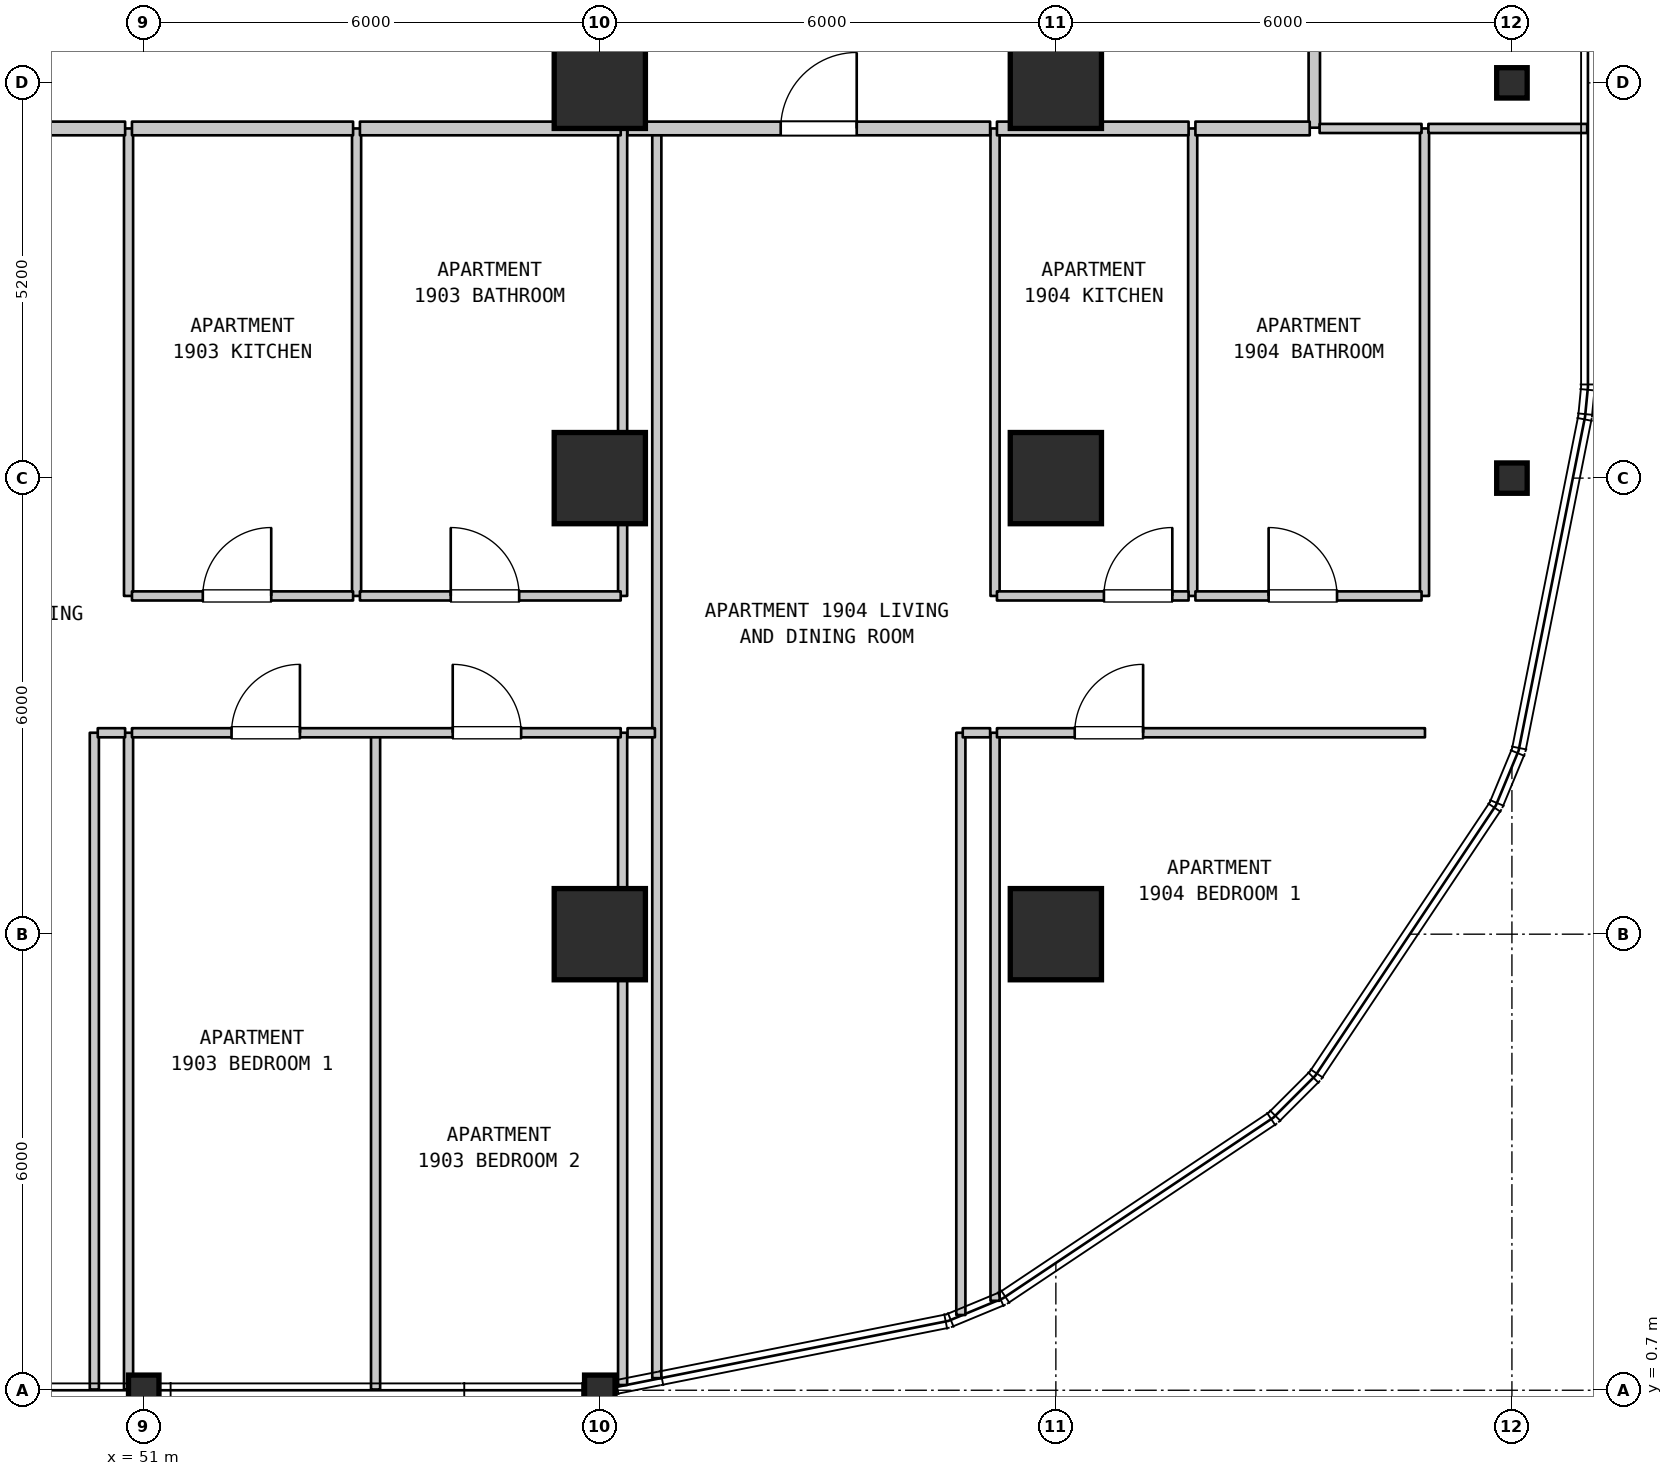
"""IFC4 building model, lengths in metres.
Left out: names, types, materials, properties, quantities, classifications, styles, units other than length and angle.
Written with IfcOpenShell. Run it as: python <this file> out.ifc"""

import sys

from ifc_helpers import new_model, si_unit, direction, frame, frame_2d, origin, origin_2d, place, context, subcontext, project, spatial, rectangle, i_section, extrude, element, fill, save


model = new_model("IFC4")
c1 = context("Model", 3, precision=1e-05, world=origin(), true_north=direction((0.0, 1.0)))
c2 = subcontext(c1, "Body", "Model", "MODEL_VIEW")
j1 = project(units=[si_unit("LENGTHUNIT", "METRE"), si_unit("PLANEANGLEUNIT", "RADIAN")], contexts=[c1])
p1 = place(None, origin())
s1 = spatial("IfcSite", under=j1, at=p1, CompositionType="ELEMENT")
p2 = place(p1, origin())
s2 = spatial("IfcBuilding", under=s1, at=p2, CompositionType="ELEMENT")
p3 = place(p2, frame((0.0, 0.0, 81.2)))
s3 = spatial("IfcBuildingStorey", under=s2, at=p3, CompositionType="ELEMENT", Elevation=81.2)
for number, where, z_axis, x_axis in (
    (1, (51.0, 0.7, 0.0), (0.0, 0.0, 1.0), (1.0, 0.0, 0.0)),
    (2, (57.0, 0.7, 0.0), (0.0, 0.0, 1.0), (1.0, 0.0, 0.0)),
):
    element("IfcColumn", number, at=place(p3, frame(where, z_axis=z_axis, x_axis=x_axis)), inside=s3, PredefinedType="COLUMN", context=c2, shape_type="SweptSolid", body=[
        extrude(i_section(OverallWidth=0.401, OverallDepth=0.399, WebThickness=0.025, FlangeThickness=0.04, FilletRadius=0.015, at=origin_2d()), origin(), (0.0, 0.0, 1.0), 5.2),
    ])
for number, where, z_axis, x_axis in (
    (3, (57.0, 6.7, 0.0), (0.0, 0.0, 1.0), (1.0, 0.0, 0.0)),
    (4, (57.0, 12.7, 0.0), (0.0, 0.0, 1.0), (1.0, 0.0, 0.0)),
    (5, (57.0, 17.9, 0.0), (0.0, 0.0, 1.0), (1.0, 0.0, 0.0)),
    (6, (63.0, 6.7, 0.0), (0.0, 0.0, 1.0), (1.0, 0.0, 0.0)),
    (7, (63.0, 12.7, 0.0), (0.0, 0.0, 1.0), (1.0, 0.0, 0.0)),
    (8, (63.0, 17.9, 0.0), (0.0, 0.0, 1.0), (1.0, 0.0, 0.0)),
):
    element("IfcColumn", number, at=place(p3, frame(where, z_axis=z_axis, x_axis=x_axis)), inside=s3, PredefinedType="COLUMN", context=c2, shape_type="SweptSolid", body=[
        extrude(rectangle(XDim=1.2, YDim=1.2, at=origin_2d()), origin(), (0.0, 0.0, 1.0), 5.2),
    ])
for number, where, z_axis, x_axis in (
    (9, (69.0, 12.7, 0.0), (0.0, 0.0, 1.0), (1.0, 0.0, 0.0)),
    (10, (69.0, 17.9, 0.0), (0.0, 0.0, 1.0), (1.0, 0.0, 0.0)),
):
    element("IfcColumn", number, at=place(p3, frame(where, z_axis=z_axis, x_axis=x_axis)), inside=s3, PredefinedType="COLUMN", context=c2, shape_type="SweptSolid", body=[
        extrude(i_section(OverallWidth=0.401, OverallDepth=0.399, WebThickness=0.025, FlangeThickness=0.04, FilletRadius=0.015, at=origin_2d()), origin(), (0.0, 0.0, 1.0), 5.2),
    ])
for number, where, z_axis, x_axis in (
    (11, (50.35, 0.71, 0.0), (0.0, 0.0, 1.0), (0.0, 1.0, 0.0)),
    (12, (50.8, 0.71, 0.0), (0.0, 0.0, 1.0), (0.0, 1.0, 0.0)),
):
    element("IfcWall", number, at=place(p3, frame(where, z_axis=z_axis, x_axis=x_axis)), inside=s3, PredefinedType="PARTITIONING", context=c2, shape_type="SweptSolid", body=[
        extrude(rectangle(XDim=8.64, YDim=0.12, at=frame_2d((4.32, 0.0))), origin(), (0.0, 0.0, 1.0), 4.885),
    ])
for number, where, z_axis, x_axis in (
    (13, (50.8, 11.15, 0.0), (0.0, 0.0, 1.0), (0.0, 1.0, 0.0)),
    (14, (53.8, 11.15, 0.0), (0.0, 0.0, 1.0), (0.0, 1.0, 0.0)),
):
    element("IfcWall", number, at=place(p3, frame(where, z_axis=z_axis, x_axis=x_axis)), inside=s3, PredefinedType="PARTITIONING", context=c2, shape_type="SweptSolid", body=[
        extrude(rectangle(XDim=6.15, YDim=0.12, at=frame_2d((3.075, 0.0))), origin(), (0.0, 0.0, 1.0), 4.885),
    ])
p4 = place(p3, frame((54.05, 0.71, 0.0), z_axis=(0.0, 0.0, 1.0), x_axis=(0.0, 1.0, 0.0)))
e15 = element("IfcWall", 15, at=p4, inside=s3, PredefinedType="PARTITIONING", context=c2, shape_type="SweptSolid", body=[
    extrude(rectangle(XDim=8.64, YDim=0.12, at=frame_2d((4.32, 0.0))), origin(), (0.0, 0.0, 1.0), 4.885),
])
p5 = place(p3, frame((57.3, 0.769, 0.0), z_axis=(0.0, 0.0, 1.0), x_axis=(0.0, 1.0, 0.0)))
e16 = element("IfcWall", 16, at=p5, inside=s3, PredefinedType="PARTITIONING", context=c2, shape_type="SweptSolid", body=[
    extrude(rectangle(XDim=8.581, YDim=0.12, at=frame_2d((4.291, 0.0))), origin(), (0.0, 0.0, 1.0), 4.885),
])
p6 = place(p3, frame((57.3, 11.15, 0.0), z_axis=(0.0, 0.0, 1.0), x_axis=(0.0, 1.0, 0.0)))
e17 = element("IfcWall", 17, at=p6, inside=s3, PredefinedType="PARTITIONING", context=c2, shape_type="SweptSolid", body=[
    extrude(rectangle(XDim=6.15, YDim=0.12, at=frame_2d((3.075, 0.0))), origin(), (0.0, 0.0, 1.0), 4.885),
])
p7 = place(p3, frame((57.75, 0.859, 0.0), z_axis=(0.0, 0.0, 1.0), x_axis=(0.0, 1.0, 0.0)))
e18 = element("IfcWall", 18, at=p7, inside=s3, PredefinedType="PARTITIONING", context=c2, shape_type="SweptSolid", body=[
    extrude(rectangle(XDim=16.441, YDim=0.12, at=frame_2d((8.221, 0.0))), origin(), (0.0, 0.0, 1.0), 4.885),
])
p8 = place(p3, frame((61.75, 1.69, 0.0), z_axis=(0.0, 0.0, 1.0), x_axis=(0.0, 1.0, 0.0)))
e19 = element("IfcWall", 19, at=p8, inside=s3, PredefinedType="PARTITIONING", context=c2, shape_type="SweptSolid", body=[
    extrude(rectangle(XDim=7.66, YDim=0.12, at=frame_2d((3.83, 0.0))), origin(), (0.0, 0.0, 1.0), 4.885),
])
p9 = place(p3, frame((62.2, 1.877, 0.0), z_axis=(0.0, 0.0, 1.0), x_axis=(0.0, 1.0, 0.0)))
e20 = element("IfcWall", 20, at=p9, inside=s3, PredefinedType="PARTITIONING", context=c2, shape_type="SweptSolid", body=[
    extrude(rectangle(XDim=7.473, YDim=0.12, at=frame_2d((3.737, 0.0))), origin(), (0.0, 0.0, 1.0), 4.885),
])
for number, where, z_axis, x_axis in (
    (21, (62.2, 11.15, 0.0), (0.0, 0.0, 1.0), (0.0, 1.0, 0.0)),
    (22, (64.8, 11.15, 0.0), (0.0, 0.0, 1.0), (0.0, 1.0, 0.0)),
):
    element("IfcWall", number, at=place(p3, frame(where, z_axis=z_axis, x_axis=x_axis)), inside=s3, PredefinedType="PARTITIONING", context=c2, shape_type="SweptSolid", body=[
        extrude(rectangle(XDim=6.15, YDim=0.12, at=frame_2d((3.075, 0.0))), origin(), (0.0, 0.0, 1.0), 4.885),
    ])
p10 = place(p3, frame((66.4, 17.31, 0.0), z_axis=(0.0, 0.0, 1.0), x_axis=(0.0, 1.0, 0.0)))
e23 = element("IfcWall", 23, at=p10, inside=s3, PredefinedType="STANDARD", context=c2, shape_type="SweptSolid", body=[
    extrude(rectangle(XDim=2.19, YDim=0.15, at=frame_2d((1.095, 0.0))), origin(), (0.0, 0.0, 1.0), 4.885),
])
p11 = place(p3, frame((67.85, 11.15, 0.0), z_axis=(0.0, 0.0, 1.0), x_axis=(0.0, 1.0, 0.0)))
e24 = element("IfcWall", 24, at=p11, inside=s3, PredefinedType="PARTITIONING", context=c2, shape_type="SweptSolid", body=[
    extrude(rectangle(XDim=6.15, YDim=0.12, at=frame_2d((3.075, 0.0))), origin(), (0.0, 0.0, 1.0), 4.885),
])
p12 = place(p3, frame((50.395, 9.35, 0.0), z_axis=(0.0, 0.0, 1.0), x_axis=(1.0, 0.0, 0.0)))
e25 = element("IfcWall", 25, at=p12, inside=s3, PredefinedType="PARTITIONING", context=c2, shape_type="SweptSolid", body=[
    extrude(rectangle(XDim=0.36, YDim=0.12, at=frame_2d((0.18, 0.0))), origin(), (0.0, 0.0, 1.0), 4.885),
])
p13 = place(p3, frame((50.845, 9.35, 0.0), z_axis=(0.0, 0.0, 1.0), x_axis=(1.0, 0.0, 0.0)))
e26 = element("IfcWall", 26, at=p13, inside=s3, PredefinedType="PARTITIONING", context=c2, shape_type="SweptSolid", body=[
    extrude(rectangle(XDim=6.43, YDim=0.12, at=frame_2d((3.215, 0.0))), origin(), (0.0, 0.0, 1.0), 4.885),
])
p14 = place(p13, frame((1.31, 0.0, 0.0)))
e27 = element("IfcOpeningElement", 27, at=p14, cuts=e26, PredefinedType="OPENING", context=c2, shape_type="SweptSolid", body=[
    extrude(rectangle(XDim=0.9, YDim=2.15, at=frame_2d((0.45, 1.075))), frame((0.0, 0.07, 0.0), z_axis=(0.0, -1.0, 0.0), x_axis=(1.0, 0.0, 0.0)), (0.0, 0.0, 1.0), 0.14),
])
p15 = place(p13, frame((4.22, 0.0, 0.0)))
e28 = element("IfcOpeningElement", 28, at=p15, cuts=e26, PredefinedType="OPENING", context=c2, shape_type="SweptSolid", body=[
    extrude(rectangle(XDim=0.9, YDim=2.15, at=frame_2d((0.45, 1.075))), frame((0.0, 0.07, 0.0), z_axis=(0.0, -1.0, 0.0), x_axis=(1.0, 0.0, 0.0)), (0.0, 0.0, 1.0), 0.14),
])
for number, where, z_axis, x_axis in (
    (29, (57.365, 9.35, 0.0), (0.0, 0.0, 1.0), (1.0, 0.0, 0.0)),
    (30, (61.775, 9.35, 0.0), (0.0, 0.0, 1.0), (1.0, 0.0, 0.0)),
):
    element("IfcWall", number, at=place(p3, frame(where, z_axis=z_axis, x_axis=x_axis)), inside=s3, PredefinedType="PARTITIONING", context=c2, shape_type="SweptSolid", body=[
        extrude(rectangle(XDim=0.36, YDim=0.12, at=frame_2d((0.18, 0.0))), origin(), (0.0, 0.0, 1.0), 4.885),
    ])
p16 = place(p3, frame((62.225, 9.35, 0.0), z_axis=(0.0, 0.0, 1.0), x_axis=(1.0, 0.0, 0.0)))
e31 = element("IfcWall", 31, at=p16, inside=s3, PredefinedType="PARTITIONING", context=c2, shape_type="SweptSolid", body=[
    extrude(rectangle(XDim=5.631, YDim=0.12, at=frame_2d((2.815, 0.0))), origin(), (0.0, 0.0, 1.0), 4.885),
])
p17 = place(p16, frame((1.023, 0.0, 0.0)))
e32 = element("IfcOpeningElement", 32, at=p17, cuts=e31, PredefinedType="OPENING", context=c2, shape_type="SweptSolid", body=[
    extrude(rectangle(XDim=0.9, YDim=2.15, at=frame_2d((0.45, 1.075))), frame((0.0, 0.07, 0.0), z_axis=(0.0, -1.0, 0.0), x_axis=(1.0, 0.0, 0.0)), (0.0, 0.0, 1.0), 0.14),
])
p18 = place(p3, frame((50.845, 11.15, 0.0), z_axis=(0.0, 0.0, 1.0), x_axis=(1.0, 0.0, 0.0)))
e33 = element("IfcWall", 33, at=p18, inside=s3, PredefinedType="PARTITIONING", context=c2, shape_type="SweptSolid", body=[
    extrude(rectangle(XDim=2.909, YDim=0.12, at=frame_2d((1.455, 0.0))), origin(), (0.0, 0.0, 1.0), 4.885),
])
p19 = place(p18, frame((0.932, 0.0, 0.0)))
e34 = element("IfcOpeningElement", 34, at=p19, cuts=e33, PredefinedType="OPENING", context=c2, shape_type="SweptSolid", body=[
    extrude(rectangle(XDim=0.9, YDim=2.15, at=frame_2d((0.45, 1.075))), frame((0.0, 0.07, 0.0), z_axis=(0.0, -1.0, 0.0), x_axis=(1.0, 0.0, 0.0)), (0.0, 0.0, 1.0), 0.14),
])
p20 = place(p3, frame((53.844, 11.15, 0.0), z_axis=(0.0, 0.0, 1.0), x_axis=(1.0, 0.0, 0.0)))
e35 = element("IfcWall", 35, at=p20, inside=s3, PredefinedType="PARTITIONING", context=c2, shape_type="SweptSolid", body=[
    extrude(rectangle(XDim=3.431, YDim=0.12, at=frame_2d((1.715, 0.0))), origin(), (0.0, 0.0, 1.0), 4.885),
])
p21 = place(p20, frame((1.195, 0.0, 0.0)))
e36 = element("IfcOpeningElement", 36, at=p21, cuts=e35, PredefinedType="OPENING", context=c2, shape_type="SweptSolid", body=[
    extrude(rectangle(XDim=0.9, YDim=2.1, at=frame_2d((0.45, 1.05))), frame((0.0, 0.07, 0.0), z_axis=(0.0, -1.0, 0.0), x_axis=(1.0, 0.0, 0.0)), (0.0, 0.0, 1.0), 0.14),
])
p22 = place(p3, frame((62.225, 11.15, 0.0), z_axis=(0.0, 0.0, 1.0), x_axis=(1.0, 0.0, 0.0)))
e37 = element("IfcWall", 37, at=p22, inside=s3, PredefinedType="PARTITIONING", context=c2, shape_type="SweptSolid", body=[
    extrude(rectangle(XDim=2.521, YDim=0.12, at=frame_2d((1.26, 0.0))), origin(), (0.0, 0.0, 1.0), 4.885),
])
p23 = place(p22, frame((1.407, 0.0, 0.0)))
e38 = element("IfcOpeningElement", 38, at=p23, cuts=e37, PredefinedType="OPENING", context=c2, shape_type="SweptSolid", body=[
    extrude(rectangle(XDim=0.9, YDim=2.15, at=frame_2d((0.45, 1.075))), frame((0.0, 0.07, 0.0), z_axis=(0.0, -1.0, 0.0), x_axis=(1.0, 0.0, 0.0)), (0.0, 0.0, 1.0), 0.14),
])
p24 = place(p3, frame((64.836, 11.15, 0.0), z_axis=(0.0, 0.0, 1.0), x_axis=(1.0, 0.0, 0.0)))
e39 = element("IfcWall", 39, at=p24, inside=s3, PredefinedType="PARTITIONING", context=c2, shape_type="SweptSolid", body=[
    extrude(rectangle(XDim=2.975, YDim=0.12, at=frame_2d((1.488, 0.0))), origin(), (0.0, 0.0, 1.0), 4.885),
])
p25 = place(p24, frame((0.963, 0.0, 0.0)))
e40 = element("IfcOpeningElement", 40, at=p25, cuts=e39, PredefinedType="OPENING", context=c2, shape_type="SweptSolid", body=[
    extrude(rectangle(XDim=0.9, YDim=2.1, at=frame_2d((0.45, 1.05))), frame((0.0, 0.07, 0.0), z_axis=(0.0, -1.0, 0.0), x_axis=(1.0, 0.0, 0.0)), (0.0, 0.0, 1.0), 0.14),
])
p26 = place(p3, frame((45.955, 17.3, 0.0), z_axis=(0.0, 0.0, 1.0), x_axis=(1.0, 0.0, 0.0)))
e41 = element("IfcWall", 41, at=p26, inside=s3, PredefinedType="STANDARD", context=c2, shape_type="SweptSolid", body=[
    extrude(rectangle(XDim=4.8, YDim=0.18, at=frame_2d((2.4, 0.0))), origin(), (0.0, 0.0, 1.0), 4.885),
])
p27 = place(p26, frame((1.9, 0.0, 0.0)))
e42 = element("IfcOpeningElement", 42, at=p27, cuts=e41, PredefinedType="OPENING", context=c2, shape_type="SweptSolid", body=[
    extrude(rectangle(XDim=1.0, YDim=2.15, at=frame_2d((0.5, 1.075))), frame((0.0, 0.1, 0.0), z_axis=(0.0, -1.0, 0.0), x_axis=(1.0, 0.0, 0.0)), (0.0, 0.0, 1.0), 0.2),
])
p28 = place(p3, frame((50.845, 17.3, 0.0), z_axis=(0.0, 0.0, 1.0), x_axis=(1.0, 0.0, 0.0)))
e43 = element("IfcWall", 43, at=p28, inside=s3, PredefinedType="STANDARD", context=c2, shape_type="SweptSolid", body=[
    extrude(rectangle(XDim=2.909, YDim=0.18, at=frame_2d((1.455, 0.0))), origin(), (0.0, 0.0, 1.0), 4.885),
])
p29 = place(p3, frame((53.844, 17.3, 0.0), z_axis=(0.0, 0.0, 1.0), x_axis=(1.0, 0.0, 0.0)))
e44 = element("IfcWall", 44, at=p29, inside=s3, PredefinedType="STANDARD", context=c2, shape_type="SweptSolid", body=[
    extrude(rectangle(XDim=3.431, YDim=0.18, at=frame_2d((1.715, 0.0))), origin(), (0.0, 0.0, 1.0), 4.885),
])
p30 = place(p3, frame((57.365, 17.3, 0.0), z_axis=(0.0, 0.0, 1.0), x_axis=(1.0, 0.0, 0.0)))
e45 = element("IfcWall", 45, at=p30, inside=s3, PredefinedType="STANDARD", context=c2, shape_type="SweptSolid", body=[
    extrude(rectangle(XDim=4.77, YDim=0.18, at=frame_2d((2.385, 0.0))), origin(), (0.0, 0.0, 1.0), 4.885),
])
p31 = place(p30, frame((2.015, 0.0, 0.0)))
e46 = element("IfcOpeningElement", 46, at=p31, cuts=e45, PredefinedType="OPENING", context=c2, shape_type="SweptSolid", body=[
    extrude(rectangle(XDim=1.0, YDim=2.15, at=frame_2d((0.5, 1.075))), frame((0.0, 0.1, 0.0), z_axis=(0.0, -1.0, 0.0), x_axis=(1.0, 0.0, 0.0)), (0.0, 0.0, 1.0), 0.2),
])
p32 = place(p3, frame((62.225, 17.3, 0.0), z_axis=(0.0, 0.0, 1.0), x_axis=(1.0, 0.0, 0.0)))
e47 = element("IfcWall", 47, at=p32, inside=s3, PredefinedType="STANDARD", context=c2, shape_type="SweptSolid", body=[
    extrude(rectangle(XDim=2.521, YDim=0.18, at=frame_2d((1.26, 0.0))), origin(), (0.0, 0.0, 1.0), 4.885),
])
p33 = place(p3, frame((64.836, 17.3, 0.0), z_axis=(0.0, 0.0, 1.0), x_axis=(1.0, 0.0, 0.0)))
e48 = element("IfcWall", 48, at=p33, inside=s3, PredefinedType="STANDARD", context=c2, shape_type="SweptSolid", body=[
    extrude(rectangle(XDim=1.504, YDim=0.18, at=frame_2d((0.752, 0.0))), origin(), (0.0, 0.0, 1.0), 4.885),
])
p34 = place(p3, frame((66.47, 17.3, 0.0), z_axis=(0.0, 0.0, 1.0), x_axis=(1.0, 0.0, 0.0)))
e49 = element("IfcWall", 49, at=p34, inside=s3, PredefinedType="PARTITIONING", context=c2, shape_type="SweptSolid", body=[
    extrude(rectangle(XDim=1.341, YDim=0.12, at=frame_2d((0.67, 0.0))), origin(), (0.0, 0.0, 1.0), 4.885),
])
p35 = place(p3, frame((67.901, 17.3, 0.0), z_axis=(0.0, 0.0, 1.0), x_axis=(1.0, 0.0, 0.0)))
e50 = element("IfcWall", 50, at=p35, inside=s3, PredefinedType="PARTITIONING", context=c2, shape_type="SweptSolid", body=[
    extrude(rectangle(XDim=2.089, YDim=0.12, at=frame_2d((1.044, 0.0))), origin(), (0.0, 0.0, 1.0), 4.885),
])
p36 = place(p14, origin())
e51 = element("IfcDoor", 51, at=p36, inside=s3, OperationType="SINGLE_SWING_RIGHT", PredefinedType="DOOR", context=c2, shape_type="SweptSolid", body=[
    extrude(rectangle(XDim=0.9, YDim=2.15, at=frame_2d((0.45, 1.075))), frame((0.0, 0.025, 0.0), z_axis=(0.0, -1.0, 0.0), x_axis=(1.0, 0.0, 0.0)), (0.0, 0.0, 1.0), 0.05),
])
fill(e27, e51)
p37 = place(p15, origin())
e52 = element("IfcDoor", 52, at=p37, inside=s3, OperationType="SINGLE_SWING_LEFT", PredefinedType="DOOR", context=c2, shape_type="SweptSolid", body=[
    extrude(rectangle(XDim=0.9, YDim=2.15, at=frame_2d((0.45, 1.075))), frame((0.0, 0.025, 0.0), z_axis=(0.0, -1.0, 0.0), x_axis=(1.0, 0.0, 0.0)), (0.0, 0.0, 1.0), 0.05),
])
fill(e28, e52)
p38 = place(p17, origin())
e53 = element("IfcDoor", 53, at=p38, inside=s3, OperationType="SINGLE_SWING_RIGHT", PredefinedType="DOOR", context=c2, shape_type="SweptSolid", body=[
    extrude(rectangle(XDim=0.9, YDim=2.15, at=frame_2d((0.45, 1.075))), frame((0.0, 0.025, 0.0), z_axis=(0.0, -1.0, 0.0), x_axis=(1.0, 0.0, 0.0)), (0.0, 0.0, 1.0), 0.05),
])
fill(e32, e53)
p39 = place(p19, origin())
e54 = element("IfcDoor", 54, at=p39, inside=s3, OperationType="SINGLE_SWING_RIGHT", PredefinedType="DOOR", context=c2, shape_type="SweptSolid", body=[
    extrude(rectangle(XDim=0.9, YDim=2.15, at=frame_2d((0.45, 1.075))), frame((0.0, 0.025, 0.0), z_axis=(0.0, -1.0, 0.0), x_axis=(1.0, 0.0, 0.0)), (0.0, 0.0, 1.0), 0.05),
])
fill(e34, e54)
p40 = place(p21, origin())
e55 = element("IfcDoor", 55, at=p40, inside=s3, OperationType="SINGLE_SWING_LEFT", PredefinedType="DOOR", context=c2, shape_type="SweptSolid", body=[
    extrude(rectangle(XDim=0.9, YDim=2.1, at=frame_2d((0.45, 1.05))), frame((0.0, 0.025, 0.0), z_axis=(0.0, -1.0, 0.0), x_axis=(1.0, 0.0, 0.0)), (0.0, 0.0, 1.0), 0.05),
])
fill(e36, e55)
p41 = place(p23, origin())
e56 = element("IfcDoor", 56, at=p41, inside=s3, OperationType="SINGLE_SWING_RIGHT", PredefinedType="DOOR", context=c2, shape_type="SweptSolid", body=[
    extrude(rectangle(XDim=0.9, YDim=2.15, at=frame_2d((0.45, 1.075))), frame((0.0, 0.025, 0.0), z_axis=(0.0, -1.0, 0.0), x_axis=(1.0, 0.0, 0.0)), (0.0, 0.0, 1.0), 0.05),
])
fill(e38, e56)
p42 = place(p25, origin())
e57 = element("IfcDoor", 57, at=p42, inside=s3, OperationType="SINGLE_SWING_LEFT", PredefinedType="DOOR", context=c2, shape_type="SweptSolid", body=[
    extrude(rectangle(XDim=0.9, YDim=2.1, at=frame_2d((0.45, 1.05))), frame((0.0, 0.025, 0.0), z_axis=(0.0, -1.0, 0.0), x_axis=(1.0, 0.0, 0.0)), (0.0, 0.0, 1.0), 0.05),
])
fill(e40, e57)
p43 = place(p31, origin())
e58 = element("IfcDoor", 58, at=p43, inside=s3, OperationType="SINGLE_SWING_RIGHT", PredefinedType="DOOR", context=c2, shape_type="SweptSolid", body=[
    extrude(rectangle(XDim=1.0, YDim=2.15, at=frame_2d((0.5, 1.075))), frame((0.0, 0.025, 0.0), z_axis=(0.0, -1.0, 0.0), x_axis=(1.0, 0.0, 0.0)), (0.0, 0.0, 1.0), 0.05),
])
fill(e46, e58)
save(model, sys.argv[1])
